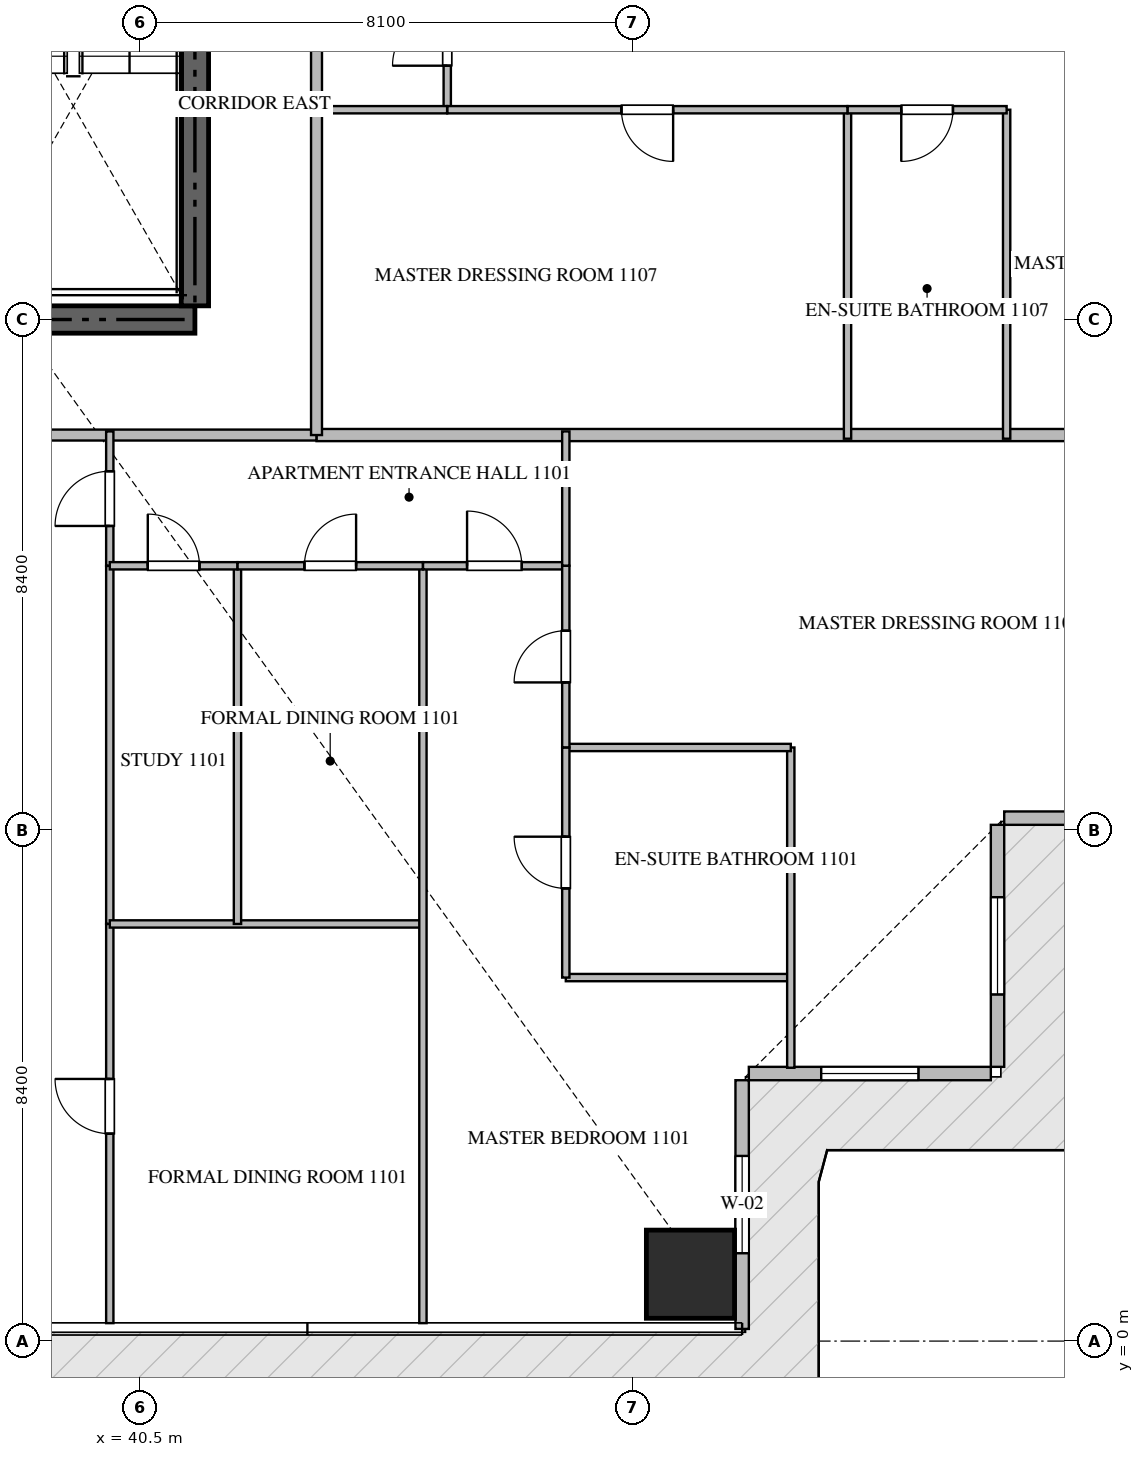
"""IFC4 building model, lengths in metres.
Left out: names, types, materials, properties, quantities, classifications, styles, units other than length and angle.
Written with IfcOpenShell. Run it as: python <this file> out.ifc"""

import sys

from ifc_helpers import new_model, si_unit, direction, frame, frame_2d, origin, origin_2d, place, context, subcontext, project, spatial, rectangle, extrude, source, transform, mapped, element, fill, save


model = new_model("IFC4")
c1 = context("Model", 3, precision=1e-05, world=origin(), true_north=direction((0.0, 1.0)))
c2 = subcontext(c1, "Body", "Model", "MODEL_VIEW")
j1 = project(units=[si_unit("LENGTHUNIT", "METRE"), si_unit("PLANEANGLEUNIT", "RADIAN")], contexts=[c1])
p1 = place(None, origin())
s1 = spatial("IfcSite", under=j1, at=p1, CompositionType="ELEMENT")
p2 = place(p1, origin())
s2 = spatial("IfcBuilding", under=s1, at=p2, CompositionType="ELEMENT")
p3 = place(p2, frame((0.0, 0.0, 49.2)))
s3 = spatial("IfcBuildingStorey", under=s2, at=p3, CompositionType="ELEMENT", Elevation=49.2)
p4 = place(p3, frame((23.4, 16.8, -0.26), z_axis=(0.0, 0.0, 1.0), x_axis=(1.0, 0.0, 0.0)))
e1 = element("IfcWall", 1, at=p4, inside=s3, PredefinedType="SHEAR", context=c2, shape_type="SweptSolid", body=[
    extrude(rectangle(XDim=18.0, YDim=0.45, at=frame_2d((9.0, 0.0))), origin(), (0.0, 0.0, 1.0), 3.748),
])
p5 = place(p3, frame((41.4, 17.025, -0.26), z_axis=(0.0, 0.0, 1.0), x_axis=(0.0, 1.0, 0.0)))
e2 = element("IfcWall", 2, at=p5, inside=s3, PredefinedType="SHEAR", context=c2, shape_type="SweptSolid", body=[
    extrude(rectangle(XDim=8.325, YDim=0.45, at=frame_2d((4.163, 0.0))), origin(), (0.0, 0.0, 1.0), 3.748),
])
m1 = source(origin(), c2, "Body", "SweptSolid", [
    extrude(rectangle(XDim=1.45, YDim=1.45, at=origin_2d()), origin(), (0.0, 0.0, 1.0), 3.75),
])
p6 = place(p3, frame((49.55, 1.1, -0.26), z_axis=(0.0, 0.0, 1.0), x_axis=(1.0, 0.0, 0.0)))
e3 = element("IfcColumn", 3, at=p6, inside=s3, PredefinedType="COLUMN", context=c2, shape_type="MappedRepresentation", body=[
    mapped(m1, transform((0.0, 0.0, 0.0), scale=1.0)),
])
p7 = place(p3, frame((50.4, 0.2, 0.0), z_axis=(0.0, 0.0, 1.0), x_axis=(0.0, 1.0, 0.0)))
e4 = element("IfcWall", 4, at=p7, inside=s3, PredefinedType="ELEMENTEDWALL", context=c2, shape_type="SweptSolid", body=[
    extrude(rectangle(XDim=4.09, YDim=0.22, at=frame_2d((2.045, 0.0))), origin(), (0.0, 0.0, 1.0), 3.475),
])
p8 = place(p7, frame((1.245, 0.0, 0.65)))
e5 = element("IfcOpeningElement", 5, at=p8, cuts=e4, PredefinedType="OPENING", context=c2, shape_type="SweptSolid", body=[
    extrude(rectangle(XDim=1.6, YDim=2.1, at=frame_2d((0.8, 1.05))), frame((0.0, 0.12, 0.0), z_axis=(0.0, -1.0, 0.0), x_axis=(1.0, 0.0, 0.0)), (0.0, 0.0, 1.0), 0.24),
])
p9 = place(p3, frame((50.51, 4.4, 0.0), z_axis=(0.0, 0.0, 1.0), x_axis=(1.0, 0.0, 0.0)))
e6 = element("IfcWall", 6, at=p9, inside=s3, PredefinedType="ELEMENTEDWALL", context=c2, shape_type="SweptSolid", body=[
    extrude(rectangle(XDim=3.98, YDim=0.22, at=frame_2d((1.99, 0.0))), origin(), (0.0, 0.0, 1.0), 3.475),
])
p10 = place(p9, frame((1.19, 0.0, 0.65)))
e7 = element("IfcOpeningElement", 7, at=p10, cuts=e6, PredefinedType="OPENING", context=c2, shape_type="SweptSolid", body=[
    extrude(rectangle(XDim=1.6, YDim=2.1, at=frame_2d((0.8, 1.05))), frame((0.0, 0.12, 0.0), z_axis=(0.0, -1.0, 0.0), x_axis=(1.0, 0.0, 0.0)), (0.0, 0.0, 1.0), 0.24),
])
p11 = place(p3, frame((54.6, 4.51, 0.0), z_axis=(0.0, 0.0, 1.0), x_axis=(0.0, 1.0, 0.0)))
e8 = element("IfcWall", 8, at=p11, inside=s3, PredefinedType="ELEMENTEDWALL", context=c2, shape_type="SweptSolid", body=[
    extrude(rectangle(XDim=3.98, YDim=0.22, at=frame_2d((1.99, 0.0))), origin(), (0.0, 0.0, 1.0), 3.475),
])
p12 = place(p11, frame((1.19, 0.0, 0.65)))
e9 = element("IfcOpeningElement", 9, at=p12, cuts=e8, PredefinedType="OPENING", context=c2, shape_type="SweptSolid", body=[
    extrude(rectangle(XDim=1.6, YDim=2.1, at=frame_2d((0.8, 1.05))), frame((0.0, 0.12, 0.0), z_axis=(0.0, -1.0, 0.0), x_axis=(1.0, 0.0, 0.0)), (0.0, 0.0, 1.0), 0.24),
])
p13 = place(p3, frame((54.71, 8.6, 0.0), z_axis=(0.0, 0.0, 1.0), x_axis=(1.0, 0.0, 0.0)))
e10 = element("IfcWall", 10, at=p13, inside=s3, PredefinedType="ELEMENTEDWALL", context=c2, shape_type="SweptSolid", body=[
    extrude(rectangle(XDim=4.09, YDim=0.22, at=frame_2d((2.045, 0.0))), origin(), (0.0, 0.0, 1.0), 3.475),
])
p14 = place(p13, frame((1.245, 0.0, 0.65)))
e11 = element("IfcOpeningElement", 11, at=p14, cuts=e10, PredefinedType="OPENING", context=c2, shape_type="SweptSolid", body=[
    extrude(rectangle(XDim=1.6, YDim=2.1, at=frame_2d((0.8, 1.05))), frame((0.0, 0.12, 0.0), z_axis=(0.0, -1.0, 0.0), x_axis=(1.0, 0.0, 0.0)), (0.0, 0.0, 1.0), 0.24),
])
p15 = place(p3, frame((43.4, 14.9, 0.0), z_axis=(0.0, 0.0, 1.0), x_axis=(1.0, 0.0, 0.0)))
e12 = element("IfcWall", 12, at=p15, inside=s3, PredefinedType="PARTITIONING", context=c2, shape_type="SweptSolid", body=[
    extrude(rectangle(XDim=15.318, YDim=0.2, at=frame_2d((7.659, 0.0))), origin(), (0.0, 0.0, 1.0), 3.49),
])
p16 = place(p3, frame((21.402, 14.9, 0.0), z_axis=(0.0, 0.0, 1.0), x_axis=(1.0, 0.0, 0.0)))
e13 = element("IfcWall", 13, at=p16, inside=s3, PredefinedType="PARTITIONING", context=c2, shape_type="SweptSolid", body=[
    extrude(rectangle(XDim=21.996, YDim=0.18, at=frame_2d((10.998, 0.0))), origin(), (0.0, 0.0, 1.0), 3.49),
])
p17 = place(p16, frame((15.222, 0.0, 0.0)))
e14 = element("IfcOpeningElement", 14, at=p17, cuts=e13, PredefinedType="OPENING", context=c2, shape_type="SweptSolid", body=[
    extrude(rectangle(XDim=1.0, YDim=2.15, at=frame_2d((0.5, 1.075))), frame((0.0, 0.1, 0.0), z_axis=(0.0, -1.0, 0.0), x_axis=(1.0, 0.0, 0.0)), (0.0, 0.0, 1.0), 0.2),
])
p18 = place(p3, frame((43.4, 14.9, 0.0), z_axis=(0.0, 0.0, 1.0), x_axis=(0.0, 1.0, 0.0)))
e15 = element("IfcWall", 15, at=p18, inside=s3, PredefinedType="PARTITIONING", context=c2, shape_type="SweptSolid", body=[
    extrude(rectangle(XDim=20.6, YDim=0.18, at=frame_2d((10.3, 0.0))), origin(), (0.0, 0.0, 1.0), 3.49),
])
p19 = place(p18, frame((17.64, 0.0, 0.0)))
e16 = element("IfcOpeningElement", 16, at=p19, cuts=e15, PredefinedType="OPENING", context=c2, shape_type="SweptSolid", body=[
    extrude(rectangle(XDim=1.0, YDim=2.15, at=frame_2d((0.5, 1.075))), frame((0.0, 0.1, 0.0), z_axis=(0.0, -1.0, 0.0), x_axis=(1.0, 0.0, 0.0)), (0.0, 0.0, 1.0), 0.2),
])
p20 = place(p3, frame((40.0, 12.75, 0.0), z_axis=(0.0, 0.0, 1.0), x_axis=(0.0, 1.0, 0.0)))
e17 = element("IfcWall", 17, at=p20, inside=s3, PredefinedType="PARTITIONING", context=c2, shape_type="SweptSolid", body=[
    extrude(rectangle(XDim=2.21, YDim=0.12, at=frame_2d((1.105, 0.0))), origin(), (0.0, 0.0, 1.0), 3.49),
])
p21 = place(p20, frame((0.655, 0.0, 0.0)))
e18 = element("IfcOpeningElement", 18, at=p21, cuts=e17, PredefinedType="OPENING", context=c2, shape_type="SweptSolid", body=[
    extrude(rectangle(XDim=0.9, YDim=2.1, at=frame_2d((0.45, 1.05))), frame((0.0, 0.07, 0.0), z_axis=(0.0, -1.0, 0.0), x_axis=(1.0, 0.0, 0.0)), (0.0, 0.0, 1.0), 0.14),
])
p22 = place(p3, frame((40.0, 0.295, 0.0), z_axis=(0.0, 0.0, 1.0), x_axis=(0.0, 1.0, 0.0)))
e19 = element("IfcWall", 19, at=p22, inside=s3, PredefinedType="PARTITIONING", context=c2, shape_type="SweptSolid", body=[
    extrude(rectangle(XDim=6.565, YDim=0.12, at=frame_2d((3.283, 0.0))), origin(), (0.0, 0.0, 1.0), 3.49),
])
p23 = place(p22, frame((3.116, 0.0, 0.0)))
e20 = element("IfcOpeningElement", 20, at=p23, cuts=e19, PredefinedType="OPENING", context=c2, shape_type="SweptSolid", body=[
    extrude(rectangle(XDim=0.9, YDim=2.1, at=frame_2d((0.45, 1.05))), frame((0.0, 0.07, 0.0), z_axis=(0.0, -1.0, 0.0), x_axis=(1.0, 0.0, 0.0)), (0.0, 0.0, 1.0), 0.14),
])
p24 = place(p3, frame((40.0, 6.862, 0.0), z_axis=(0.0, 0.0, 1.0), x_axis=(0.0, 1.0, 0.0)))
e21 = element("IfcWall", 21, at=p24, inside=s3, PredefinedType="PARTITIONING", context=c2, shape_type="SweptSolid", body=[
    extrude(rectangle(XDim=5.886, YDim=0.12, at=frame_2d((2.943, 0.0))), origin(), (0.0, 0.0, 1.0), 3.49),
])
p25 = place(p3, frame((40.0, 6.86, 0.0), z_axis=(0.0, 0.0, 1.0), x_axis=(1.0, 0.0, 0.0)))
e22 = element("IfcWall", 22, at=p25, inside=s3, PredefinedType="PARTITIONING", context=c2, shape_type="SweptSolid", body=[
    extrude(rectangle(XDim=5.15, YDim=0.12, at=frame_2d((2.575, 0.0))), origin(), (0.0, 0.0, 1.0), 3.49),
])
p26 = place(p3, frame((45.15, 0.295, 0.0), z_axis=(0.0, 0.0, 1.0), x_axis=(0.0, 1.0, 0.0)))
e23 = element("IfcWall", 23, at=p26, inside=s3, PredefinedType="PARTITIONING", context=c2, shape_type="SweptSolid", body=[
    extrude(rectangle(XDim=12.455, YDim=0.12, at=frame_2d((6.228, 0.0))), origin(), (0.0, 0.0, 1.0), 3.49),
])
p27 = place(p3, frame((42.1, 6.86, 0.0), z_axis=(0.0, 0.0, 1.0), x_axis=(0.0, 1.0, 0.0)))
e24 = element("IfcWall", 24, at=p27, inside=s3, PredefinedType="PARTITIONING", context=c2, shape_type="SweptSolid", body=[
    extrude(rectangle(XDim=5.89, YDim=0.12, at=frame_2d((2.945, 0.0))), origin(), (0.0, 0.0, 1.0), 3.49),
])
p28 = place(p3, frame((40.0, 12.75, 0.0), z_axis=(0.0, 0.0, 1.0), x_axis=(1.0, 0.0, 0.0)))
e25 = element("IfcWall", 25, at=p28, inside=s3, PredefinedType="PARTITIONING", context=c2, shape_type="SweptSolid", body=[
    extrude(rectangle(XDim=2.1, YDim=0.12, at=frame_2d((1.05, 0.0))), origin(), (0.0, 0.0, 1.0), 3.49),
])
p29 = place(p28, frame((0.625, 0.0, 0.0)))
e26 = element("IfcOpeningElement", 26, at=p29, cuts=e25, PredefinedType="OPENING", context=c2, shape_type="SweptSolid", body=[
    extrude(rectangle(XDim=0.85, YDim=2.1, at=frame_2d((0.425, 1.05))), frame((0.0, 0.07, 0.0), z_axis=(0.0, -1.0, 0.0), x_axis=(1.0, 0.0, 0.0)), (0.0, 0.0, 1.0), 0.14),
])
p30 = place(p3, frame((42.102, 12.75, 0.0), z_axis=(0.0, 0.0, 1.0), x_axis=(1.0, 0.0, 0.0)))
e27 = element("IfcWall", 27, at=p30, inside=s3, PredefinedType="PARTITIONING", context=c2, shape_type="SweptSolid", body=[
    extrude(rectangle(XDim=3.048, YDim=0.12, at=frame_2d((1.524, 0.0))), origin(), (0.0, 0.0, 1.0), 3.49),
])
p31 = place(p30, frame((1.099, 0.0, 0.0)))
e28 = element("IfcOpeningElement", 28, at=p31, cuts=e27, PredefinedType="OPENING", context=c2, shape_type="SweptSolid", body=[
    extrude(rectangle(XDim=0.85, YDim=2.1, at=frame_2d((0.425, 1.05))), frame((0.0, 0.07, 0.0), z_axis=(0.0, -1.0, 0.0), x_axis=(1.0, 0.0, 0.0)), (0.0, 0.0, 1.0), 0.14),
])
p32 = place(p3, frame((45.152, 12.75, 0.0), z_axis=(0.0, 0.0, 1.0), x_axis=(1.0, 0.0, 0.0)))
e29 = element("IfcWall", 29, at=p32, inside=s3, PredefinedType="PARTITIONING", context=c2, shape_type="SweptSolid", body=[
    extrude(rectangle(XDim=2.348, YDim=0.12, at=frame_2d((1.174, 0.0))), origin(), (0.0, 0.0, 1.0), 3.49),
])
p33 = place(p32, frame((0.724, 0.0, 0.0)))
e30 = element("IfcOpeningElement", 30, at=p33, cuts=e29, PredefinedType="OPENING", context=c2, shape_type="SweptSolid", body=[
    extrude(rectangle(XDim=0.9, YDim=2.1, at=frame_2d((0.45, 1.05))), frame((0.0, 0.07, 0.0), z_axis=(0.0, -1.0, 0.0), x_axis=(1.0, 0.0, 0.0)), (0.0, 0.0, 1.0), 0.14),
])
p34 = place(p3, frame((47.5, 5.978, 0.0), z_axis=(0.0, 0.0, 1.0), x_axis=(1.0, 0.0, 0.0)))
e31 = element("IfcWall", 31, at=p34, inside=s3, PredefinedType="PARTITIONING", context=c2, shape_type="SweptSolid", body=[
    extrude(rectangle(XDim=3.7, YDim=0.12, at=frame_2d((1.85, 0.0))), origin(), (0.0, 0.0, 1.0), 3.49),
])
p35 = place(p3, frame((51.2, 4.495, 0.0), z_axis=(0.0, 0.0, 1.0), x_axis=(0.0, 1.0, 0.0)))
e32 = element("IfcWall", 32, at=p35, inside=s3, PredefinedType="PARTITIONING", context=c2, shape_type="SweptSolid", body=[
    extrude(rectangle(XDim=5.267, YDim=0.12, at=frame_2d((2.633, 0.0))), origin(), (0.0, 0.0, 1.0), 3.49),
])
p36 = place(p3, frame((47.5, 9.762, 0.0), z_axis=(0.0, 0.0, 1.0), x_axis=(1.0, 0.0, 0.0)))
e33 = element("IfcWall", 33, at=p36, inside=s3, PredefinedType="PARTITIONING", context=c2, shape_type="SweptSolid", body=[
    extrude(rectangle(XDim=3.7, YDim=0.12, at=frame_2d((1.85, 0.0))), origin(), (0.0, 0.0, 1.0), 3.49),
])
p37 = place(p3, frame((47.5, 5.978, 0.0), z_axis=(0.0, 0.0, 1.0), x_axis=(0.0, 1.0, 0.0)))
e34 = element("IfcWall", 34, at=p37, inside=s3, PredefinedType="PARTITIONING", context=c2, shape_type="SweptSolid", body=[
    extrude(rectangle(XDim=3.784, YDim=0.12, at=frame_2d((1.892, 0.0))), origin(), (0.0, 0.0, 1.0), 3.49),
])
p38 = place(p37, frame((1.467, 0.0, 0.0)))
e35 = element("IfcOpeningElement", 35, at=p38, cuts=e34, PredefinedType="OPENING", context=c2, shape_type="SweptSolid", body=[
    extrude(rectangle(XDim=0.85, YDim=2.1, at=frame_2d((0.425, 1.05))), frame((0.0, 0.07, 0.0), z_axis=(0.0, -1.0, 0.0), x_axis=(1.0, 0.0, 0.0)), (0.0, 0.0, 1.0), 0.14),
])
p39 = place(p3, frame((47.5, 9.764, 0.0), z_axis=(0.0, 0.0, 1.0), x_axis=(0.0, 1.0, 0.0)))
e36 = element("IfcWall", 36, at=p39, inside=s3, PredefinedType="PARTITIONING", context=c2, shape_type="SweptSolid", body=[
    extrude(rectangle(XDim=2.986, YDim=0.12, at=frame_2d((1.493, 0.0))), origin(), (0.0, 0.0, 1.0), 3.49),
])
p40 = place(p39, frame((1.068, 0.0, 0.0)))
e37 = element("IfcOpeningElement", 37, at=p40, cuts=e36, PredefinedType="OPENING", context=c2, shape_type="SweptSolid", body=[
    extrude(rectangle(XDim=0.85, YDim=2.1, at=frame_2d((0.425, 1.05))), frame((0.0, 0.07, 0.0), z_axis=(0.0, -1.0, 0.0), x_axis=(1.0, 0.0, 0.0)), (0.0, 0.0, 1.0), 0.14),
])
p41 = place(p3, frame((47.5, 12.752, 0.0), z_axis=(0.0, 0.0, 1.0), x_axis=(0.0, 1.0, 0.0)))
e38 = element("IfcWall", 38, at=p41, inside=s3, PredefinedType="PARTITIONING", context=c2, shape_type="SweptSolid", body=[
    extrude(rectangle(XDim=2.208, YDim=0.12, at=frame_2d((1.104, 0.0))), origin(), (0.0, 0.0, 1.0), 3.49),
])
p42 = place(p3, frame((45.55, 20.25, 0.0), z_axis=(0.0, 0.0, 1.0), x_axis=(0.0, 1.0, 0.0)))
e39 = element("IfcWall", 39, at=p42, inside=s3, PredefinedType="PARTITIONING", context=c2, shape_type="SweptSolid", body=[
    extrude(rectangle(XDim=2.348, YDim=0.12, at=frame_2d((1.174, 0.0))), origin(), (0.0, 0.0, 1.0), 3.49),
])
p43 = place(p42, frame((0.724, 0.0, 0.0)))
e40 = element("IfcOpeningElement", 40, at=p43, cuts=e39, PredefinedType="OPENING", context=c2, shape_type="SweptSolid", body=[
    extrude(rectangle(XDim=0.9, YDim=2.1, at=frame_2d((0.45, 1.05))), frame((0.0, 0.07, 0.0), z_axis=(0.0, -1.0, 0.0), x_axis=(1.0, 0.0, 0.0)), (0.0, 0.0, 1.0), 0.14),
])
for number, where, z_axis, x_axis in (
    (41, (54.75, 14.84, 0.0), (0.0, 0.0, 1.0), (0.0, 1.0, 0.0)),
    (42, (52.133, 14.84, 0.0), (0.0, 0.0, 1.0), (0.0, 1.0, 0.0)),
):
    element("IfcWall", number, at=place(p3, frame(where, z_axis=z_axis, x_axis=x_axis)), inside=s3, PredefinedType="PARTITIONING", context=c2, shape_type="SweptSolid", body=[
        extrude(rectangle(XDim=5.41, YDim=0.12, at=frame_2d((2.705, 0.0))), origin(), (0.0, 0.0, 1.0), 3.49),
    ])
p44 = place(p3, frame((54.75, 20.25, 0.0), z_axis=(0.0, 0.0, 1.0), x_axis=(-1.0, 0.0, 0.0)))
e43 = element("IfcWall", 43, at=p44, inside=s3, PredefinedType="PARTITIONING", context=c2, shape_type="SweptSolid", body=[
    extrude(rectangle(XDim=2.617, YDim=0.12, at=frame_2d((1.309, 0.0))), origin(), (0.0, 0.0, 1.0), 3.49),
])
p45 = place(p44, frame((0.883, 0.0, 0.0)))
e44 = element("IfcOpeningElement", 44, at=p45, cuts=e43, PredefinedType="OPENING", context=c2, shape_type="SweptSolid", body=[
    extrude(rectangle(XDim=0.85, YDim=2.1, at=frame_2d((0.425, 1.05))), frame((0.0, 0.07, 0.0), z_axis=(0.0, -1.0, 0.0), x_axis=(1.0, 0.0, 0.0)), (0.0, 0.0, 1.0), 0.14),
])
p46 = place(p3, frame((52.131, 20.25, 0.0), z_axis=(0.0, 0.0, 1.0), x_axis=(-1.0, 0.0, 0.0)))
e45 = element("IfcWall", 45, at=p46, inside=s3, PredefinedType="PARTITIONING", context=c2, shape_type="SweptSolid", body=[
    extrude(rectangle(XDim=6.581, YDim=0.12, at=frame_2d((3.291, 0.0))), origin(), (0.0, 0.0, 1.0), 3.49),
])
p47 = place(p46, frame((2.866, 0.0, 0.0)))
e46 = element("IfcOpeningElement", 46, at=p47, cuts=e45, PredefinedType="OPENING", context=c2, shape_type="SweptSolid", body=[
    extrude(rectangle(XDim=0.85, YDim=2.1, at=frame_2d((0.425, 1.05))), frame((0.0, 0.07, 0.0), z_axis=(0.0, -1.0, 0.0), x_axis=(1.0, 0.0, 0.0)), (0.0, 0.0, 1.0), 0.14),
])
p48 = place(p3, frame((45.548, 20.25, 0.0), z_axis=(0.0, 0.0, 1.0), x_axis=(-1.0, 0.0, 0.0)))
e47 = element("IfcWall", 47, at=p48, inside=s3, PredefinedType="PARTITIONING", context=c2, shape_type="SweptSolid", body=[
    extrude(rectangle(XDim=2.208, YDim=0.12, at=frame_2d((1.104, 0.0))), origin(), (0.0, 0.0, 1.0), 3.49),
])
m2 = source(origin(), c2, "Body", "SweptSolid", [
    extrude(rectangle(XDim=1.6, YDim=2.1, at=frame_2d((0.8, 1.05))), frame((0.0, 0.03, 0.0), z_axis=(0.0, -1.0, 0.0), x_axis=(1.0, 0.0, 0.0)), (0.0, 0.0, 1.0), 0.06),
])
p49 = place(p8, origin())
e48 = element("IfcWindow", 48, at=p49, inside=s3, PartitioningType="SINGLE_PANEL", PredefinedType="WINDOW", context=c2, shape_type="MappedRepresentation", body=[
    mapped(m2, transform((0.0, 0.0, 0.0), scale=1.0)),
])
fill(e5, e48)
p50 = place(p10, origin())
e49 = element("IfcWindow", 49, at=p50, inside=s3, PartitioningType="SINGLE_PANEL", PredefinedType="WINDOW", context=c2, shape_type="MappedRepresentation", body=[
    mapped(m2, transform((0.0, 0.0, 0.0), scale=1.0)),
])
fill(e7, e49)
p51 = place(p12, origin())
e50 = element("IfcWindow", 50, at=p51, inside=s3, PartitioningType="SINGLE_PANEL", PredefinedType="WINDOW", context=c2, shape_type="MappedRepresentation", body=[
    mapped(m2, transform((0.0, 0.0, 0.0), scale=1.0)),
])
fill(e9, e50)
m3 = source(origin(), c2, "Body", "SweptSolid", [
    extrude(rectangle(XDim=0.9, YDim=2.1, at=frame_2d((0.45, 1.05))), frame((0.0, 0.025, 0.0), z_axis=(0.0, -1.0, 0.0), x_axis=(1.0, 0.0, 0.0)), (0.0, 0.0, 1.0), 0.05),
])
p52 = place(p21, origin())
e51 = element("IfcDoor", 51, at=p52, inside=s3, OperationType="SINGLE_SWING_LEFT", PredefinedType="DOOR", context=c2, shape_type="MappedRepresentation", body=[
    mapped(m3, transform((0.0, 0.0, 0.0), scale=1.0)),
])
fill(e18, e51)
p53 = place(p23, origin())
e52 = element("IfcDoor", 52, at=p53, inside=s3, OperationType="SINGLE_SWING_RIGHT", PredefinedType="DOOR", context=c2, shape_type="MappedRepresentation", body=[
    mapped(m3, transform((0.0, 0.0, 0.0), scale=1.0)),
])
fill(e20, e52)
m4 = source(origin(), c2, "Body", "SweptSolid", [
    extrude(rectangle(XDim=0.85, YDim=2.1, at=frame_2d((0.425, 1.05))), frame((0.0, 0.025, 0.0), z_axis=(0.0, -1.0, 0.0), x_axis=(1.0, 0.0, 0.0)), (0.0, 0.0, 1.0), 0.05),
])
p54 = place(p29, origin())
e53 = element("IfcDoor", 53, at=p54, inside=s3, OperationType="SINGLE_SWING_LEFT", PredefinedType="DOOR", context=c2, shape_type="MappedRepresentation", body=[
    mapped(m4, transform((0.0, 0.0, 0.0), scale=1.0)),
])
fill(e26, e53)
p55 = place(p31, origin())
e54 = element("IfcDoor", 54, at=p55, inside=s3, OperationType="SINGLE_SWING_RIGHT", PredefinedType="DOOR", context=c2, shape_type="MappedRepresentation", body=[
    mapped(m4, transform((0.0, 0.0, 0.0), scale=1.0)),
])
fill(e28, e54)
p56 = place(p33, origin())
e55 = element("IfcDoor", 55, at=p56, inside=s3, OperationType="SINGLE_SWING_LEFT", PredefinedType="DOOR", context=c2, shape_type="MappedRepresentation", body=[
    mapped(m3, transform((0.0, 0.0, 0.0), scale=1.0)),
])
fill(e30, e55)
p57 = place(p38, origin())
e56 = element("IfcDoor", 56, at=p57, inside=s3, OperationType="SINGLE_SWING_RIGHT", PredefinedType="DOOR", context=c2, shape_type="MappedRepresentation", body=[
    mapped(m4, transform((0.0, 0.0, 0.0), scale=1.0)),
])
fill(e35, e56)
p58 = place(p40, origin())
e57 = element("IfcDoor", 57, at=p58, inside=s3, OperationType="SINGLE_SWING_LEFT", PredefinedType="DOOR", context=c2, shape_type="MappedRepresentation", body=[
    mapped(m4, transform((0.0, 0.0, 0.0), scale=1.0)),
])
fill(e37, e57)
p59 = place(p43, origin())
e58 = element("IfcDoor", 58, at=p59, inside=s3, OperationType="SINGLE_SWING_LEFT", PredefinedType="DOOR", context=c2, shape_type="MappedRepresentation", body=[
    mapped(m3, transform((0.0, 0.0, 0.0), scale=1.0)),
])
fill(e40, e58)
p60 = place(p45, origin())
e59 = element("IfcDoor", 59, at=p60, inside=s3, OperationType="SINGLE_SWING_RIGHT", PredefinedType="DOOR", context=c2, shape_type="MappedRepresentation", body=[
    mapped(m4, transform((0.0, 0.0, 0.0), scale=1.0)),
])
fill(e44, e59)
p61 = place(p47, origin())
e60 = element("IfcDoor", 60, at=p61, inside=s3, OperationType="SINGLE_SWING_LEFT", PredefinedType="DOOR", context=c2, shape_type="MappedRepresentation", body=[
    mapped(m4, transform((0.0, 0.0, 0.0), scale=1.0)),
])
fill(e46, e60)
save(model, sys.argv[1])
